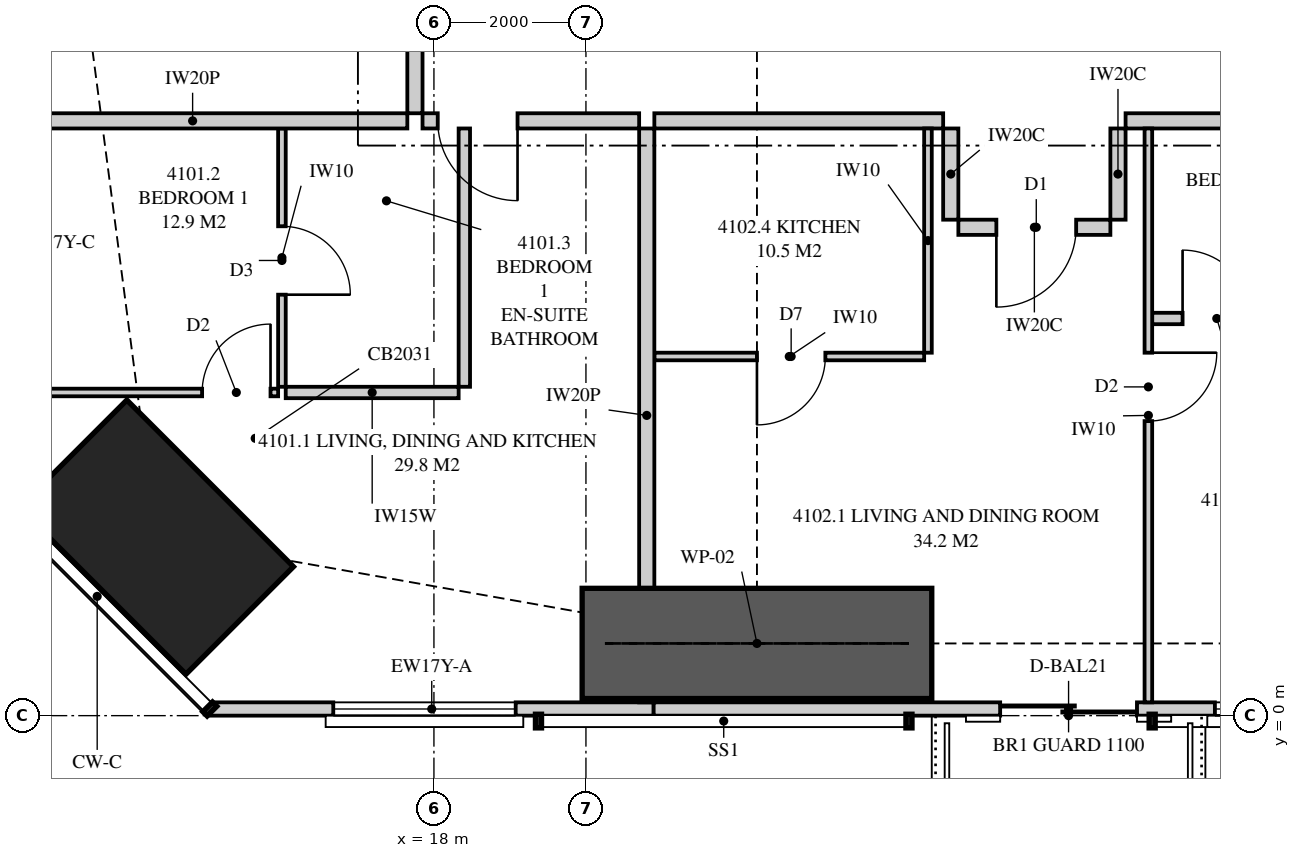
"""IFC4 building model, lengths in metres.
Left out: names, types, materials, properties, quantities, classifications, styles, units other than length and angle.
Written with IfcOpenShell. Run it as: python <this file> out.ifc"""

import sys

from ifc_helpers import new_model, si_unit, direction, frame, frame_2d, origin, origin_2d, place, context, subcontext, project, spatial, polyline, rectangle, hollow_rectangle, outline, extrude, element, fill, save


model = new_model("IFC4")
c1 = context("Model", 3, precision=1e-05, world=origin(), true_north=direction((0.0, 1.0)))
c2 = subcontext(c1, "Body", "Model", "MODEL_VIEW")
j1 = project(units=[si_unit("LENGTHUNIT", "METRE"), si_unit("PLANEANGLEUNIT", "RADIAN")], contexts=[c1])
p1 = place(None, origin())
s1 = spatial("IfcSite", under=j1, at=p1, CompositionType="ELEMENT")
p2 = place(p1, origin())
s2 = spatial("IfcBuilding", under=s1, at=p2, CompositionType="ELEMENT")
p3 = place(p2, frame((0.0, 0.0, 154.35)))
s3 = spatial("IfcBuildingStorey", under=s2, at=p3, CompositionType="ELEMENT", Elevation=154.35)
p4 = place(p3, frame((14.348, 2.348, 0.0), z_axis=(0.0, 0.0, 1.0), x_axis=(0.707106781187, 0.707106781187, 0.0)))
e1 = element("IfcColumn", 1, at=p4, inside=s3, PredefinedType="COLUMN", context=c2, shape_type="SweptSolid", body=[
    extrude(hollow_rectangle(XDim=2.0, YDim=3.1, WallThickness=0.125, at=origin_2d()), origin(), (0.0, 0.0, 1.0), 3.35),
])
p5 = place(p3, frame((15.051, 0.087, 0.0), z_axis=(0.0, 0.0, 1.0), x_axis=(1.0, 0.0, 0.0)))
e2 = element("IfcWall", 2, at=p5, inside=s3, PredefinedType="SOLIDWALL", context=c2, shape_type="SweptSolid", body=[
    extrude(rectangle(XDim=5.84, YDim=0.175, at=frame_2d((2.92, 0.0))), origin(), (0.0, 0.0, 1.0), 3.11),
])
p6 = place(p5, frame((1.625, 0.0, 0.4)))
e3 = element("IfcOpeningElement", 3, at=p6, cuts=e2, PredefinedType="OPENING", context=c2, shape_type="SweptSolid", body=[
    extrude(rectangle(XDim=2.4, YDim=1.7, at=frame_2d((1.2, 0.85))), frame((0.0, 0.097, 0.0), z_axis=(0.0, -1.0, 0.0), x_axis=(1.0, 0.0, 0.0)), (0.0, 0.0, 1.0), 0.195),
])
p7 = place(p3, frame((20.891, 0.087, 0.0), z_axis=(0.0, 0.0, 1.0), x_axis=(1.0, 0.0, 0.0)))
e4 = element("IfcWall", 4, at=p7, inside=s3, PredefinedType="SOLIDWALL", context=c2, shape_type="SweptSolid", body=[
    extrude(rectangle(XDim=23.218, YDim=0.175, at=frame_2d((11.609, 0.0))), origin(), (0.0, 0.0, 1.0), 2.15),
])
p8 = place(p7, frame((4.559, 0.0, 0.0)))
e5 = element("IfcOpeningElement", 5, at=p8, cuts=e4, PredefinedType="OPENING", context=c2, shape_type="SweptSolid", body=[
    extrude(rectangle(XDim=1.8, YDim=2.1, at=frame_2d((0.9, 1.05))), frame((0.0, 0.097, 0.0), z_axis=(0.0, -1.0, 0.0), x_axis=(1.0, 0.0, 0.0)), (0.0, 0.0, 1.0), 0.195),
])
p9 = place(p7, frame((7.384, 0.0, 0.4)))
e6 = element("IfcOpeningElement", 6, at=p9, cuts=e4, PredefinedType="OPENING", context=c2, shape_type="SweptSolid", body=[
    extrude(rectangle(XDim=1.8, YDim=1.7, at=frame_2d((0.9, 0.85))), frame((0.0, 0.097, 0.0), z_axis=(0.0, -1.0, 0.0), x_axis=(1.0, 0.0, 0.0)), (0.0, 0.0, 1.0), 0.195),
])
p10 = place(p7, frame((14.009, 0.0, 0.4)))
e7 = element("IfcOpeningElement", 7, at=p10, cuts=e4, PredefinedType="OPENING", context=c2, shape_type="SweptSolid", body=[
    extrude(rectangle(XDim=2.4, YDim=1.7, at=frame_2d((1.2, 0.85))), frame((0.0, 0.097, 0.0), z_axis=(0.0, -1.0, 0.0), x_axis=(1.0, 0.0, 0.0)), (0.0, 0.0, 1.0), 0.195),
])
p11 = place(p7, frame((16.959, 0.0, 0.0)))
e8 = element("IfcOpeningElement", 8, at=p11, cuts=e4, PredefinedType="OPENING", context=c2, shape_type="SweptSolid", body=[
    extrude(rectangle(XDim=1.8, YDim=2.1, at=frame_2d((0.9, 1.05))), frame((0.0, 0.097, 0.0), z_axis=(0.0, -1.0, 0.0), x_axis=(1.0, 0.0, 0.0)), (0.0, 0.0, 1.0), 0.195),
])
p12 = place(p3, frame((20.8, 0.175, 0.0), z_axis=(0.0, 0.0, 1.0), x_axis=(0.0, 1.0, 0.0)))
e9 = element("IfcWall", 9, at=p12, inside=s3, PredefinedType="PARTITIONING", context=c2, shape_type="SweptSolid", body=[
    extrude(outline(polyline([(0.529, 2.15), (0.0, 2.15), (0.0, 0.0), (0.529, 0.0), (0.529, 0.213), (1.021, 0.213), (1.021, 0.0), (7.55, 0.0), (7.55, 3.11), (2.159, 3.11), (2.159, 2.15), (1.021, 2.15), (1.021, 1.786), (0.529, 1.786), (0.529, 2.15)])), frame((0.0, 0.1, 0.0), z_axis=(0.0, -1.0, 0.0), x_axis=(1.0, 0.0, 0.0)), (0.0, 0.0, 1.0), 0.2),
])
p13 = place(p3, frame((17.85, 7.825, 0.0), z_axis=(0.0, 0.0, 1.0), x_axis=(1.0, 0.0, 0.0)))
e10 = element("IfcWall", 10, at=p13, inside=s3, PredefinedType="PARTITIONING", context=c2, shape_type="SweptSolid", body=[
    extrude(rectangle(XDim=2.85, YDim=0.2, at=frame_2d((1.425, 0.0))), origin(), (0.0, 0.0, 1.0), 3.11),
])
p14 = place(p13, frame((0.2, 0.0, 0.0)))
e11 = element("IfcOpeningElement", 11, at=p14, cuts=e10, PredefinedType="OPENING", context=c2, shape_type="SweptSolid", body=[
    extrude(rectangle(XDim=1.05, YDim=2.2, at=frame_2d((0.525, 1.1))), frame((0.0, 0.11, 0.0), z_axis=(0.0, -1.0, 0.0), x_axis=(1.0, 0.0, 0.0)), (0.0, 0.0, 1.0), 0.22),
])
p15 = place(p3, frame((16.0, 4.327, 0.0), z_axis=(0.0, 0.0, 1.0), x_axis=(0.0, 1.0, 0.0)))
e12 = element("IfcWall", 12, at=p15, inside=s3, PredefinedType="PARTITIONING", context=c2, shape_type="SweptSolid", body=[
    extrude(rectangle(XDim=3.398, YDim=0.1, at=frame_2d((1.699, 0.0))), origin(), (0.0, 0.0, 1.0), 3.11),
])
p16 = place(p15, frame((1.212, 0.0, 0.0)))
e13 = element("IfcOpeningElement", 13, at=p16, cuts=e12, PredefinedType="OPENING", context=c2, shape_type="SweptSolid", body=[
    extrude(rectangle(XDim=0.9, YDim=2.1, at=frame_2d((0.45, 1.05))), frame((0.0, 0.06, 0.0), z_axis=(0.0, -1.0, 0.0), x_axis=(1.0, 0.0, 0.0)), (0.0, 0.0, 1.0), 0.12),
])
p17 = place(p3, frame((15.95, 4.252, 0.0), z_axis=(0.0, 0.0, 1.0), x_axis=(-1.0, 0.0, 0.0)))
e14 = element("IfcWall", 14, at=p17, inside=s3, PredefinedType="PARTITIONING", context=c2, shape_type="SweptSolid", body=[
    extrude(outline(polyline([(0.0, 0.0), (3.95, 0.0), (3.95, 3.11), (2.92, 3.11), (2.92, 2.15), (0.782, 2.15), (0.782, 3.11), (0.0, 3.11), (0.0, 0.0)])), frame((0.0, 0.05, 0.0), z_axis=(0.0, -1.0, 0.0), x_axis=(1.0, 0.0, 0.0)), (0.0, 0.0, 1.0), 0.1),
])
p18 = place(p17, frame((0.1, 0.0, 0.0)))
e15 = element("IfcOpeningElement", 15, at=p18, cuts=e14, PredefinedType="OPENING", context=c2, shape_type="SweptSolid", body=[
    extrude(rectangle(XDim=0.9, YDim=2.1, at=frame_2d((0.45, 1.05))), frame((0.0, 0.06, 0.0), z_axis=(0.0, -1.0, 0.0), x_axis=(1.0, 0.0, 0.0)), (0.0, 0.0, 1.0), 0.12),
])
p19 = place(p3, frame((18.325, 4.252, 0.0), z_axis=(0.0, 0.0, 1.0), x_axis=(-1.0, 0.0, 0.0)))
e16 = element("IfcWall", 16, at=p19, inside=s3, PredefinedType="PLUMBINGWALL", context=c2, shape_type="SweptSolid", body=[
    extrude(rectangle(XDim=2.275, YDim=0.15, at=frame_2d((1.137, 0.0))), origin(), (0.0, 0.0, 1.0), 3.11),
])
p20 = place(p3, frame((18.4, 4.327, 0.0), z_axis=(0.0, 0.0, 1.0), x_axis=(0.0, 1.0, 0.0)))
e17 = element("IfcWall", 17, at=p20, inside=s3, PredefinedType="PLUMBINGWALL", context=c2, shape_type="SweptSolid", body=[
    extrude(rectangle(XDim=3.398, YDim=0.15, at=frame_2d((1.699, 0.0))), origin(), (0.0, 0.0, 1.0), 3.11),
])
p21 = place(p3, frame((20.9, 7.825, 0.0), z_axis=(0.0, 0.0, 1.0), x_axis=(1.0, 0.0, 0.0)))
e18 = element("IfcWall", 18, at=p21, inside=s3, PredefinedType="PARTITIONING", context=c2, shape_type="SweptSolid", body=[
    extrude(outline(polyline([(0.0, 0.0), (3.8, 0.0), (3.8, 3.11), (1.696, 3.11), (1.696, 2.531), (1.004, 2.531), (1.004, 3.11), (0.0, 3.11), (0.0, 0.0)])), frame((0.0, 0.1, 0.0), z_axis=(0.0, -1.0, 0.0), x_axis=(1.0, 0.0, 0.0)), (0.0, 0.0, 1.0), 0.2),
])
p22 = place(p3, frame((27.4, 0.175, 0.0), z_axis=(0.0, 0.0, 1.0), x_axis=(0.0, 1.0, 0.0)))
e19 = element("IfcWall", 19, at=p22, inside=s3, PredefinedType="PARTITIONING", context=c2, shape_type="SweptSolid", body=[
    extrude(outline(polyline([(0.0, 0.0), (7.55, 0.0), (7.55, 3.11), (1.835, 3.11), (1.835, 2.15), (0.0, 2.15), (0.0, 3.11), (0.0, 0.0)])), frame((0.0, 0.05, 0.0), z_axis=(0.0, -1.0, 0.0), x_axis=(1.0, 0.0, 0.0)), (0.0, 0.0, 1.0), 0.1),
])
p23 = place(p22, frame((3.7, 0.0, 0.0)))
e20 = element("IfcOpeningElement", 20, at=p23, cuts=e19, PredefinedType="OPENING", context=c2, shape_type="SweptSolid", body=[
    extrude(rectangle(XDim=0.9, YDim=2.1, at=frame_2d((0.45, 1.05))), frame((0.0, 0.06, 0.0), z_axis=(0.0, -1.0, 0.0), x_axis=(1.0, 0.0, 0.0)), (0.0, 0.0, 1.0), 0.12),
])
p24 = place(p3, frame((27.45, 5.225, 0.0), z_axis=(0.0, 0.0, 1.0), x_axis=(1.0, 0.0, 0.0)))
e21 = element("IfcWall", 21, at=p24, inside=s3, PredefinedType="PLUMBINGWALL", context=c2, shape_type="SweptSolid", body=[
    extrude(rectangle(XDim=3.45, YDim=0.15, at=frame_2d((1.725, 0.0))), origin(), (0.0, 0.0, 1.0), 3.11),
])
p25 = place(p24, frame((0.4, 0.0, 0.0)))
e22 = element("IfcOpeningElement", 22, at=p25, cuts=e21, PredefinedType="OPENING", context=c2, shape_type="SweptSolid", body=[
    extrude(rectangle(XDim=0.9, YDim=2.1, at=frame_2d((0.45, 1.05))), frame((0.0, 0.085, 0.0), z_axis=(0.0, -1.0, 0.0), x_axis=(1.0, 0.0, 0.0)), (0.0, 0.0, 1.0), 0.17),
])
p26 = place(p3, frame((20.9, 4.725, 0.0), z_axis=(0.0, 0.0, 1.0), x_axis=(1.0, 0.0, 0.0)))
e23 = element("IfcWall", 23, at=p26, inside=s3, PredefinedType="PARTITIONING", context=c2, shape_type="SweptSolid", body=[
    extrude(outline(polyline([(0.0, 0.0), (3.55, 0.0), (3.55, 3.11), (1.646, 3.11), (1.646, 2.531), (1.054, 2.531), (1.054, 3.11), (0.0, 3.11), (0.0, 0.0)])), frame((0.0, 0.05, 0.0), z_axis=(0.0, -1.0, 0.0), x_axis=(1.0, 0.0, 0.0)), (0.0, 0.0, 1.0), 0.1),
])
p27 = place(p26, frame((1.35, 0.0, 0.0)))
e24 = element("IfcOpeningElement", 24, at=p27, cuts=e23, PredefinedType="OPENING", context=c2, shape_type="SweptSolid", body=[
    extrude(rectangle(XDim=0.9, YDim=2.1, at=frame_2d((0.45, 1.05))), frame((0.0, 0.06, 0.0), z_axis=(0.0, -1.0, 0.0), x_axis=(1.0, 0.0, 0.0)), (0.0, 0.0, 1.0), 0.12),
])
p28 = place(p3, frame((24.5, 4.775, 0.0), z_axis=(0.0, 0.0, 1.0), x_axis=(0.0, 1.0, 0.0)))
e25 = element("IfcWall", 25, at=p28, inside=s3, PredefinedType="PARTITIONING", context=c2, shape_type="SweptSolid", body=[
    extrude(rectangle(XDim=2.95, YDim=0.1, at=frame_2d((1.475, 0.0))), origin(), (0.0, 0.0, 1.0), 3.11),
])
p29 = place(p3, frame((12.0, 7.825, 0.0), z_axis=(0.0, 0.0, 1.0), x_axis=(1.0, 0.0, 0.0)))
e26 = element("IfcWall", 26, at=p29, inside=s3, PredefinedType="PARTITIONING", context=c2, shape_type="SweptSolid", body=[
    extrude(outline(polyline([(0.0, 0.0), (5.65, 0.0), (5.65, 3.11), (2.749, 3.11), (2.749, 2.15), (0.51, 2.15), (0.51, 3.11), (0.0, 3.11), (0.0, 0.0)])), frame((0.0, 0.1, 0.0), z_axis=(0.0, -1.0, 0.0), x_axis=(1.0, 0.0, 0.0)), (0.0, 0.0, 1.0), 0.2),
])
p30 = place(p3, frame((17.75, 7.925, 0.0), z_axis=(0.0, 0.0, 1.0), x_axis=(0.0, 1.0, 0.0)))
e27 = element("IfcWall", 27, at=p30, inside=s3, PredefinedType="PARTITIONING", context=c2, shape_type="SweptSolid", body=[
    extrude(outline(polyline([(0.0, 0.0), (12.275, 0.0), (12.275, 3.11), (5.421, 3.11), (5.421, 2.531), (4.729, 2.531), (4.729, 3.11), (0.0, 3.11), (0.0, 0.0)])), frame((0.0, 0.1, 0.0), z_axis=(0.0, -1.0, 0.0), x_axis=(1.0, 0.0, 0.0)), (0.0, 0.0, 1.0), 0.2),
])
p31 = place(p30, frame((10.075, 0.0, 0.0)))
e28 = element("IfcOpeningElement", 28, at=p31, cuts=e27, PredefinedType="OPENING", context=c2, shape_type="SweptSolid", body=[
    extrude(rectangle(XDim=1.05, YDim=2.2, at=frame_2d((0.525, 1.1))), frame((0.0, 0.11, 0.0), z_axis=(0.0, -1.0, 0.0), x_axis=(1.0, 0.0, 0.0)), (0.0, 0.0, 1.0), 0.22),
])
p32 = place(p3, frame((27.1, 7.825, 0.0), z_axis=(0.0, 0.0, 1.0), x_axis=(1.0, 0.0, 0.0)))
e29 = element("IfcWall", 29, at=p32, inside=s3, PredefinedType="PARTITIONING", context=c2, shape_type="SweptSolid", body=[
    extrude(rectangle(XDim=3.8, YDim=0.2, at=frame_2d((1.9, 0.0))), origin(), (0.0, 0.0, 1.0), 3.11),
])
p33 = place(p3, frame((24.9, 6.425, 0.0), z_axis=(0.0, 0.0, 1.0), x_axis=(1.0, 0.0, 0.0)))
e30 = element("IfcWall", 30, at=p33, inside=s3, PredefinedType="PARTITIONING", context=c2, shape_type="SweptSolid", body=[
    extrude(rectangle(XDim=2.0, YDim=0.2, at=frame_2d((1.0, 0.0))), origin(), (0.0, 0.0, 1.0), 3.11),
])
p34 = place(p33, frame((0.5, 0.0, 0.0)))
e31 = element("IfcOpeningElement", 31, at=p34, cuts=e30, PredefinedType="OPENING", context=c2, shape_type="SweptSolid", body=[
    extrude(rectangle(XDim=1.05, YDim=2.2, at=frame_2d((0.525, 1.1))), frame((0.0, 0.11, 0.0), z_axis=(0.0, -1.0, 0.0), x_axis=(1.0, 0.0, 0.0)), (0.0, 0.0, 1.0), 0.22),
])
for number, where, z_axis, x_axis in (
    (32, (24.8, 7.725, 0.0), (0.0, 0.0, 1.0), (0.0, -1.0, 0.0)),
    (33, (27.0, 7.725, 0.0), (0.0, 0.0, 1.0), (0.0, -1.0, 0.0)),
):
    element("IfcWall", number, at=place(p3, frame(where, z_axis=z_axis, x_axis=x_axis)), inside=s3, PredefinedType="PARTITIONING", context=c2, shape_type="SweptSolid", body=[
        extrude(rectangle(XDim=1.2, YDim=0.2, at=frame_2d((0.6, 0.0))), origin(), (0.0, 0.0, 1.0), 3.11),
    ])
p35 = place(p3, frame((19.95, 0.95, 0.0), z_axis=(0.0, 0.0, 1.0), x_axis=(1.0, 0.0, 0.0)))
e34 = element("IfcWall", 34, at=p35, inside=s3, PredefinedType="SHEAR", context=c2, shape_type="SweptSolid", body=[
    extrude(rectangle(XDim=4.6, YDim=1.45, at=frame_2d((2.3, 0.0))), origin(), (0.0, 0.0, 1.0), 3.35),
])
p36 = place(p6, origin())
e35 = element("IfcWindow", 35, at=p36, inside=s3, PartitioningType="SINGLE_PANEL", PredefinedType="WINDOW", context=c2, shape_type="SweptSolid", body=[
    extrude(rectangle(XDim=2.4, YDim=1.7, at=frame_2d((1.2, 0.85))), frame((0.0, 0.03, 0.0), z_axis=(0.0, -1.0, 0.0), x_axis=(1.0, 0.0, 0.0)), (0.0, 0.0, 1.0), 0.06),
])
fill(e3, e35)
p37 = place(p8, origin())
e36 = element("IfcDoor", 36, at=p37, inside=s3, OperationType="SLIDING_TO_LEFT", PredefinedType="DOOR", context=c2, shape_type="SweptSolid", body=[
    extrude(rectangle(XDim=1.8, YDim=2.1, at=frame_2d((0.9, 1.05))), frame((0.0, 0.025, 0.0), z_axis=(0.0, -1.0, 0.0), x_axis=(1.0, 0.0, 0.0)), (0.0, 0.0, 1.0), 0.05),
])
fill(e5, e36)
p38 = place(p9, origin())
e37 = element("IfcWindow", 37, at=p38, inside=s3, PartitioningType="SINGLE_PANEL", PredefinedType="WINDOW", context=c2, shape_type="SweptSolid", body=[
    extrude(rectangle(XDim=1.8, YDim=1.7, at=frame_2d((0.9, 0.85))), frame((0.0, 0.03, 0.0), z_axis=(0.0, -1.0, 0.0), x_axis=(1.0, 0.0, 0.0)), (0.0, 0.0, 1.0), 0.06),
])
fill(e6, e37)
p39 = place(p14, frame((1.05, 0.0, 0.0), z_axis=(0.0, 0.0, 1.0), x_axis=(-1.0, 0.0, 0.0)))
e38 = element("IfcDoor", 38, at=p39, inside=s3, OperationType="SINGLE_SWING_LEFT", PredefinedType="DOOR", context=c2, shape_type="SweptSolid", body=[
    extrude(rectangle(XDim=1.05, YDim=2.2, at=frame_2d((0.525, 1.1))), frame((0.0, 0.025, 0.0), z_axis=(0.0, -1.0, 0.0), x_axis=(1.0, 0.0, 0.0)), (0.0, 0.0, 1.0), 0.05),
])
fill(e11, e38)
p40 = place(p18, frame((0.9, 0.0, 0.0), z_axis=(0.0, 0.0, 1.0), x_axis=(-1.0, 0.0, 0.0)))
e39 = element("IfcDoor", 39, at=p40, inside=s3, OperationType="SINGLE_SWING_RIGHT", PredefinedType="DOOR", context=c2, shape_type="SweptSolid", body=[
    extrude(rectangle(XDim=0.9, YDim=2.1, at=frame_2d((0.45, 1.05))), frame((0.0, 0.025, 0.0), z_axis=(0.0, -1.0, 0.0), x_axis=(1.0, 0.0, 0.0)), (0.0, 0.0, 1.0), 0.05),
])
fill(e15, e39)
p41 = place(p16, frame((0.9, 0.0, 0.0), z_axis=(0.0, 0.0, 1.0), x_axis=(-1.0, 0.0, 0.0)))
e40 = element("IfcDoor", 40, at=p41, inside=s3, OperationType="SINGLE_SWING_RIGHT", PredefinedType="DOOR", context=c2, shape_type="SweptSolid", body=[
    extrude(rectangle(XDim=0.9, YDim=2.1, at=frame_2d((0.45, 1.05))), frame((0.0, 0.025, 0.0), z_axis=(0.0, -1.0, 0.0), x_axis=(1.0, 0.0, 0.0)), (0.0, 0.0, 1.0), 0.05),
])
fill(e13, e40)
p42 = place(p34, frame((1.05, 0.0, 0.0), z_axis=(0.0, 0.0, 1.0), x_axis=(-1.0, 0.0, 0.0)))
e41 = element("IfcDoor", 41, at=p42, inside=s3, OperationType="SINGLE_SWING_RIGHT", PredefinedType="DOOR", context=c2, shape_type="SweptSolid", body=[
    extrude(rectangle(XDim=1.05, YDim=2.2, at=frame_2d((0.525, 1.1))), frame((0.0, 0.025, 0.0), z_axis=(0.0, -1.0, 0.0), x_axis=(1.0, 0.0, 0.0)), (0.0, 0.0, 1.0), 0.05),
])
fill(e31, e41)
p43 = place(p23, frame((0.9, 0.0, 0.0), z_axis=(0.0, 0.0, 1.0), x_axis=(-1.0, 0.0, 0.0)))
e42 = element("IfcDoor", 42, at=p43, inside=s3, OperationType="SINGLE_SWING_LEFT", PredefinedType="DOOR", context=c2, shape_type="SweptSolid", body=[
    extrude(rectangle(XDim=0.9, YDim=2.1, at=frame_2d((0.45, 1.05))), frame((0.0, 0.025, 0.0), z_axis=(0.0, -1.0, 0.0), x_axis=(1.0, 0.0, 0.0)), (0.0, 0.0, 1.0), 0.05),
])
fill(e20, e42)
p44 = place(p25, origin())
e43 = element("IfcDoor", 43, at=p44, inside=s3, OperationType="SINGLE_SWING_LEFT", PredefinedType="DOOR", context=c2, shape_type="SweptSolid", body=[
    extrude(rectangle(XDim=0.9, YDim=2.1, at=frame_2d((0.45, 1.05))), frame((0.0, 0.025, 0.0), z_axis=(0.0, -1.0, 0.0), x_axis=(1.0, 0.0, 0.0)), (0.0, 0.0, 1.0), 0.05),
])
fill(e22, e43)
p45 = place(p27, frame((0.9, 0.0, 0.0), z_axis=(0.0, 0.0, 1.0), x_axis=(-1.0, 0.0, 0.0)))
e44 = element("IfcDoor", 44, at=p45, inside=s3, OperationType="SINGLE_SWING_RIGHT", PredefinedType="DOOR", context=c2, shape_type="SweptSolid", body=[
    extrude(rectangle(XDim=0.9, YDim=2.1, at=frame_2d((0.45, 1.05))), frame((0.0, 0.025, 0.0), z_axis=(0.0, -1.0, 0.0), x_axis=(1.0, 0.0, 0.0)), (0.0, 0.0, 1.0), 0.05),
])
fill(e24, e44)
save(model, sys.argv[1])
